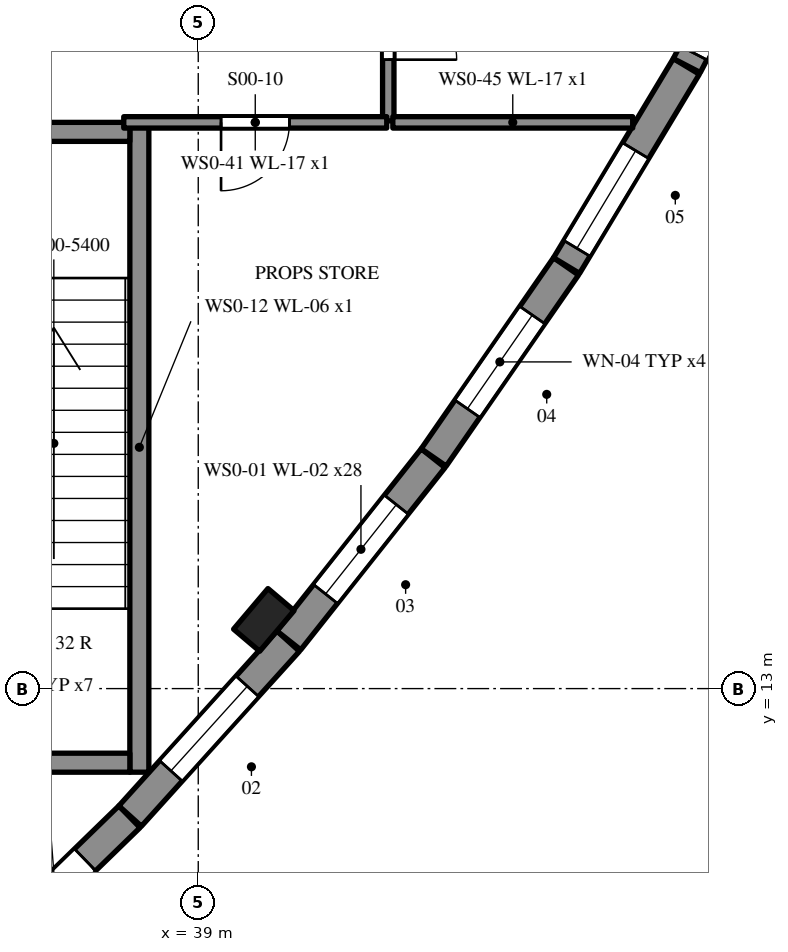
"""IFC4 building model, lengths in metres.
Left out: names, types, materials, properties, quantities, classifications, styles, units other than length and angle.
Written with IfcOpenShell. Run it as: python <this file> out.ifc"""

import sys

from ifc_helpers import new_model, si_unit, direction, frame, frame_2d, origin, origin_2d, place, context, subcontext, project, spatial, rectangle, extrude, element, fill, save


model = new_model("IFC4")
c1 = context("Model", 3, precision=1e-05, world=origin(), true_north=direction((0.0, 1.0)))
c2 = subcontext(c1, "Body", "Model", "MODEL_VIEW")
j1 = project(units=[si_unit("LENGTHUNIT", "METRE"), si_unit("PLANEANGLEUNIT", "RADIAN")], contexts=[c1])
p1 = place(None, origin())
s1 = spatial("IfcSite", under=j1, at=p1, CompositionType="ELEMENT")
p2 = place(p1, origin())
s2 = spatial("IfcBuilding", under=s1, at=p2, CompositionType="ELEMENT")
p3 = place(p2, origin())
s3 = spatial("IfcBuildingStorey", under=s2, at=p3, CompositionType="ELEMENT", Elevation=0.0)
p4 = place(p3, frame((36.139, 9.414, 0.0), z_axis=(0.0, 0.0, 1.0), x_axis=(0.717243568607, 0.696822547922, 0.0)))
e1 = element("IfcWall", 1, at=p4, inside=s3, PredefinedType="SOLIDWALL", context=c2, shape_type="SweptSolid", body=[
    extrude(rectangle(XDim=2.726, YDim=0.4, at=frame_2d((1.363, 0.0))), origin(), (0.0, 0.0, 1.0), 5.1),
])
p5 = place(p4, frame((0.813, 0.0, 0.0)))
e2 = element("IfcOpeningElement", 2, at=p5, cuts=e1, PredefinedType="OPENING", context=c2, shape_type="SweptSolid", body=[
    extrude(rectangle(XDim=1.1, YDim=2.1, at=frame_2d((0.55, 1.05))), frame((0.0, 0.21, 0.0), z_axis=(0.0, -1.0, 0.0), x_axis=(1.0, 0.0, 0.0)), (0.0, 0.0, 1.0), 0.42),
])
p6 = place(p3, frame((38.104, 11.323, 0.0), z_axis=(0.0, 0.0, 1.0), x_axis=(0.67038553216, 0.742012963681, 0.0)))
e3 = element("IfcWall", 3, at=p6, inside=s3, PredefinedType="SOLIDWALL", context=c2, shape_type="SweptSolid", body=[
    extrude(rectangle(XDim=3.102, YDim=0.4, at=frame_2d((1.551, 0.0))), origin(), (0.0, 0.0, 1.0), 5.1),
])
p7 = place(p6, frame((0.801, 0.0, 2.4)))
e4 = element("IfcOpeningElement", 4, at=p7, cuts=e3, PredefinedType="OPENING", context=c2, shape_type="SweptSolid", body=[
    extrude(rectangle(XDim=1.5, YDim=0.9, at=frame_2d((0.75, 0.45))), frame((0.0, 0.21, 0.0), z_axis=(0.0, -1.0, 0.0), x_axis=(1.0, 0.0, 0.0)), (0.0, 0.0, 1.0), 0.42),
])
p8 = place(p3, frame((40.191, 13.634, 0.0), z_axis=(0.0, 0.0, 1.0), x_axis=(0.620958553355, 0.783843399548, 0.0)))
e5 = element("IfcWall", 5, at=p8, inside=s3, PredefinedType="SOLIDWALL", context=c2, shape_type="SweptSolid", body=[
    extrude(rectangle(XDim=3.058, YDim=0.4, at=frame_2d((1.529, 0.0))), origin(), (0.0, 0.0, 1.0), 5.1),
])
p9 = place(p8, frame((0.779, 0.0, 2.4)))
e6 = element("IfcOpeningElement", 6, at=p9, cuts=e5, PredefinedType="OPENING", context=c2, shape_type="SweptSolid", body=[
    extrude(rectangle(XDim=1.5, YDim=0.9, at=frame_2d((0.75, 0.45))), frame((0.0, 0.21, 0.0), z_axis=(0.0, -1.0, 0.0), x_axis=(1.0, 0.0, 0.0)), (0.0, 0.0, 1.0), 0.42),
])
p10 = place(p3, frame((42.098, 16.042, 0.0), z_axis=(0.0, 0.0, 1.0), x_axis=(0.569371892655, 0.822080073871, 0.0)))
e7 = element("IfcWall", 7, at=p10, inside=s3, PredefinedType="SOLIDWALL", context=c2, shape_type="SweptSolid", body=[
    extrude(rectangle(XDim=3.058, YDim=0.4, at=frame_2d((1.529, 0.0))), origin(), (0.0, 0.0, 1.0), 5.1),
])
p11 = place(p10, frame((0.779, 0.0, 2.4)))
e8 = element("IfcOpeningElement", 8, at=p11, cuts=e7, PredefinedType="OPENING", context=c2, shape_type="SweptSolid", body=[
    extrude(rectangle(XDim=1.5, YDim=0.9, at=frame_2d((0.75, 0.45))), frame((0.0, 0.21, 0.0), z_axis=(0.0, -1.0, 0.0), x_axis=(1.0, 0.0, 0.0)), (0.0, 0.0, 1.0), 0.42),
])
p12 = place(p3, frame((43.846, 18.566, 0.0), z_axis=(0.0, 0.0, 1.0), x_axis=(0.515387841983, 0.856957042293, 0.0)))
e9 = element("IfcWall", 9, at=p12, inside=s3, PredefinedType="SOLIDWALL", context=c2, shape_type="SweptSolid", body=[
    extrude(rectangle(XDim=3.058, YDim=0.4, at=frame_2d((1.529, 0.0))), origin(), (0.0, 0.0, 1.0), 5.1),
])
p13 = place(p12, frame((0.264, 0.0, 2.4)))
e10 = element("IfcOpeningElement", 10, at=p13, cuts=e9, PredefinedType="OPENING", context=c2, shape_type="SweptSolid", body=[
    extrude(rectangle(XDim=1.5, YDim=0.9, at=frame_2d((0.75, 0.45))), frame((0.0, 0.21, 0.0), z_axis=(0.0, -1.0, 0.0), x_axis=(1.0, 0.0, 0.0)), (0.0, 0.0, 1.0), 0.42),
])
p14 = place(p3, frame((45.428, 21.198, 0.0), z_axis=(0.0, 0.0, 1.0), x_axis=(0.45930565039, 0.888278289457, 0.0)))
e11 = element("IfcWall", 11, at=p14, inside=s3, PredefinedType="SOLIDWALL", context=c2, shape_type="SweptSolid", body=[
    extrude(rectangle(XDim=3.059, YDim=0.4, at=frame_2d((1.529, 0.0))), origin(), (0.0, 0.0, 1.0), 5.1),
])
p15 = place(p14, frame((0.188, 0.0, 0.9)))
e12 = element("IfcOpeningElement", 12, at=p15, cuts=e11, PredefinedType="OPENING", context=c2, shape_type="SweptSolid", body=[
    extrude(rectangle(XDim=1.5, YDim=2.1, at=frame_2d((0.75, 1.05))), frame((0.0, 0.21, 0.0), z_axis=(0.0, -1.0, 0.0), x_axis=(1.0, 0.0, 0.0)), (0.0, 0.0, 1.0), 0.42),
])
p16 = place(p3, frame((39.863, 13.904, 0.0), z_axis=(0.0, 0.0, 1.0), x_axis=(0.646183644891, 0.763181955418, 0.0)))
e13 = element("IfcColumn", 13, at=p16, inside=s3, PredefinedType="PILASTER", context=c2, shape_type="SweptSolid", body=[
    extrude(rectangle(XDim=0.7, YDim=0.45, at=origin_2d()), origin(), (0.0, 0.0, 1.0), 5.1),
])
p17 = place(p3, frame((38.225, 11.9, 0.0), z_axis=(0.0, 0.0, 1.0), x_axis=(0.0, 1.0, 0.0)))
e14 = element("IfcWall", 14, at=p17, inside=s3, PredefinedType="SHEAR", context=c2, shape_type="SweptSolid", body=[
    extrude(rectangle(XDim=8.55, YDim=0.25, at=frame_2d((4.275, 0.0))), origin(), (0.0, 0.0, 1.0), 5.4),
])
p18 = place(p3, frame((38.1, 12.025, 0.0), z_axis=(0.0, 0.0, 1.0), x_axis=(-1.0, 0.0, 0.0)))
e15 = element("IfcWall", 15, at=p18, inside=s3, PredefinedType="SHEAR", context=c2, shape_type="SweptSolid", body=[
    extrude(rectangle(XDim=4.2, YDim=0.25, at=frame_2d((2.1, 0.0))), origin(), (0.0, 0.0, 1.0), 5.4),
])
p19 = place(p18, frame((1.55, 0.0, 0.0)))
e16 = element("IfcOpeningElement", 16, at=p19, cuts=e15, PredefinedType="OPENING", context=c2, shape_type="SweptSolid", body=[
    extrude(rectangle(XDim=1.1, YDim=2.1, at=frame_2d((0.55, 1.05))), frame((0.0, 0.135, 0.0), z_axis=(0.0, -1.0, 0.0), x_axis=(1.0, 0.0, 0.0)), (0.0, 0.0, 1.0), 0.27),
])
p20 = place(p3, frame((33.9, 20.325, 0.0), z_axis=(0.0, 0.0, 1.0), x_axis=(1.0, 0.0, 0.0)))
e17 = element("IfcWall", 17, at=p20, inside=s3, PredefinedType="SHEAR", context=c2, shape_type="SweptSolid", body=[
    extrude(rectangle(XDim=4.2, YDim=0.25, at=frame_2d((2.1, 0.0))), origin(), (0.0, 0.0, 1.0), 5.4),
])
p21 = place(p20, frame((1.55, 0.0, 0.0)))
e18 = element("IfcOpeningElement", 18, at=p21, cuts=e17, PredefinedType="OPENING", context=c2, shape_type="SweptSolid", body=[
    extrude(rectangle(XDim=1.1, YDim=2.1, at=frame_2d((0.55, 1.05))), frame((0.0, 0.135, 0.0), z_axis=(0.0, -1.0, 0.0), x_axis=(1.0, 0.0, 0.0)), (0.0, 0.0, 1.0), 0.27),
])
p22 = place(p3, frame((41.5, 22.98, 0.0), z_axis=(0.0, 0.0, 1.0), x_axis=(0.0, -1.0, 0.0)))
e19 = element("IfcWall", 19, at=p22, inside=s3, PredefinedType="PARTITIONING", context=c2, shape_type="SweptSolid", body=[
    extrude(rectangle(XDim=2.51, YDim=0.15, at=frame_2d((1.255, 0.0))), origin(), (0.0, 0.0, 1.0), 5.1),
])
p23 = place(p22, frame((0.805, 0.0, 0.0)))
e20 = element("IfcOpeningElement", 20, at=p23, cuts=e19, PredefinedType="OPENING", context=c2, shape_type="SweptSolid", body=[
    extrude(rectangle(XDim=0.9, YDim=2.1, at=frame_2d((0.45, 1.05))), frame((0.0, 0.085, 0.0), z_axis=(0.0, -1.0, 0.0), x_axis=(1.0, 0.0, 0.0)), (0.0, 0.0, 1.0), 0.17),
])
p24 = place(p3, frame((41.48, 20.45, 0.0), z_axis=(0.0, 0.0, 1.0), x_axis=(-1.0, 0.0, 0.0)))
e21 = element("IfcWall", 21, at=p24, inside=s3, PredefinedType="PARTITIONING", context=c2, shape_type="SweptSolid", body=[
    extrude(rectangle(XDim=3.46, YDim=0.15, at=frame_2d((1.73, 0.0))), origin(), (0.0, 0.0, 1.0), 5.1),
])
p25 = place(p24, frame((1.28, 0.0, 0.0)))
e22 = element("IfcOpeningElement", 22, at=p25, cuts=e21, PredefinedType="OPENING", context=c2, shape_type="SweptSolid", body=[
    extrude(rectangle(XDim=0.9, YDim=2.1, at=frame_2d((0.45, 1.05))), frame((0.0, 0.085, 0.0), z_axis=(0.0, -1.0, 0.0), x_axis=(1.0, 0.0, 0.0)), (0.0, 0.0, 1.0), 0.17),
])
p26 = place(p3, frame((44.716, 20.45, 0.0), z_axis=(0.0, 0.0, 1.0), x_axis=(-1.0, 0.0, 0.0)))
e23 = element("IfcWall", 23, at=p26, inside=s3, PredefinedType="PARTITIONING", context=c2, shape_type="SweptSolid", body=[
    extrude(rectangle(XDim=3.156, YDim=0.15, at=frame_2d((1.578, 0.0))), origin(), (0.0, 0.0, 1.0), 5.1),
])
p27 = place(p5, frame((1.1, 0.0, 0.0), z_axis=(0.0, 0.0, 1.0), x_axis=(-1.0, 0.0, 0.0)))
e24 = element("IfcDoor", 24, at=p27, inside=s3, OperationType="SINGLE_SWING_RIGHT", PredefinedType="DOOR", context=c2, shape_type="SweptSolid", body=[
    extrude(rectangle(XDim=1.1, YDim=2.1, at=frame_2d((0.55, 1.05))), frame((0.0, 0.025, 0.0), z_axis=(0.0, -1.0, 0.0), x_axis=(1.0, 0.0, 0.0)), (0.0, 0.0, 1.0), 0.05),
])
fill(e2, e24)
p28 = place(p7, origin())
e25 = element("IfcWindow", 25, at=p28, inside=s3, PartitioningType="SINGLE_PANEL", PredefinedType="WINDOW", context=c2, shape_type="SweptSolid", body=[
    extrude(rectangle(XDim=1.5, YDim=0.9, at=frame_2d((0.75, 0.45))), frame((0.0, 0.03, 0.0), z_axis=(0.0, -1.0, 0.0), x_axis=(1.0, 0.0, 0.0)), (0.0, 0.0, 1.0), 0.06),
])
fill(e4, e25)
p29 = place(p9, origin())
e26 = element("IfcWindow", 26, at=p29, inside=s3, PartitioningType="SINGLE_PANEL", PredefinedType="WINDOW", context=c2, shape_type="SweptSolid", body=[
    extrude(rectangle(XDim=1.5, YDim=0.9, at=frame_2d((0.75, 0.45))), frame((0.0, 0.03, 0.0), z_axis=(0.0, -1.0, 0.0), x_axis=(1.0, 0.0, 0.0)), (0.0, 0.0, 1.0), 0.06),
])
fill(e6, e26)
p30 = place(p11, origin())
e27 = element("IfcWindow", 27, at=p30, inside=s3, PartitioningType="SINGLE_PANEL", PredefinedType="WINDOW", context=c2, shape_type="SweptSolid", body=[
    extrude(rectangle(XDim=1.5, YDim=0.9, at=frame_2d((0.75, 0.45))), frame((0.0, 0.03, 0.0), z_axis=(0.0, -1.0, 0.0), x_axis=(1.0, 0.0, 0.0)), (0.0, 0.0, 1.0), 0.06),
])
fill(e8, e27)
p31 = place(p13, origin())
e28 = element("IfcWindow", 28, at=p31, inside=s3, PartitioningType="SINGLE_PANEL", PredefinedType="WINDOW", context=c2, shape_type="SweptSolid", body=[
    extrude(rectangle(XDim=1.5, YDim=0.9, at=frame_2d((0.75, 0.45))), frame((0.0, 0.03, 0.0), z_axis=(0.0, -1.0, 0.0), x_axis=(1.0, 0.0, 0.0)), (0.0, 0.0, 1.0), 0.06),
])
fill(e10, e28)
p32 = place(p15, origin())
e29 = element("IfcWindow", 29, at=p32, inside=s3, PartitioningType="SINGLE_PANEL", PredefinedType="WINDOW", context=c2, shape_type="SweptSolid", body=[
    extrude(rectangle(XDim=1.5, YDim=2.1, at=frame_2d((0.75, 1.05))), frame((0.0, 0.03, 0.0), z_axis=(0.0, -1.0, 0.0), x_axis=(1.0, 0.0, 0.0)), (0.0, 0.0, 1.0), 0.06),
])
fill(e12, e29)
p33 = place(p23, origin())
e30 = element("IfcDoor", 30, at=p33, inside=s3, OperationType="SINGLE_SWING_RIGHT", PredefinedType="DOOR", context=c2, shape_type="SweptSolid", body=[
    extrude(rectangle(XDim=0.9, YDim=2.1, at=frame_2d((0.45, 1.05))), frame((0.0, 0.025, 0.0), z_axis=(0.0, -1.0, 0.0), x_axis=(1.0, 0.0, 0.0)), (0.0, 0.0, 1.0), 0.05),
])
fill(e20, e30)
p34 = place(p25, origin())
e31 = element("IfcDoor", 31, at=p34, inside=s3, OperationType="SINGLE_SWING_RIGHT", PredefinedType="DOOR", context=c2, shape_type="SweptSolid", body=[
    extrude(rectangle(XDim=0.9, YDim=2.1, at=frame_2d((0.45, 1.05))), frame((0.0, 0.025, 0.0), z_axis=(0.0, -1.0, 0.0), x_axis=(1.0, 0.0, 0.0)), (0.0, 0.0, 1.0), 0.05),
])
fill(e22, e31)
save(model, sys.argv[1])
